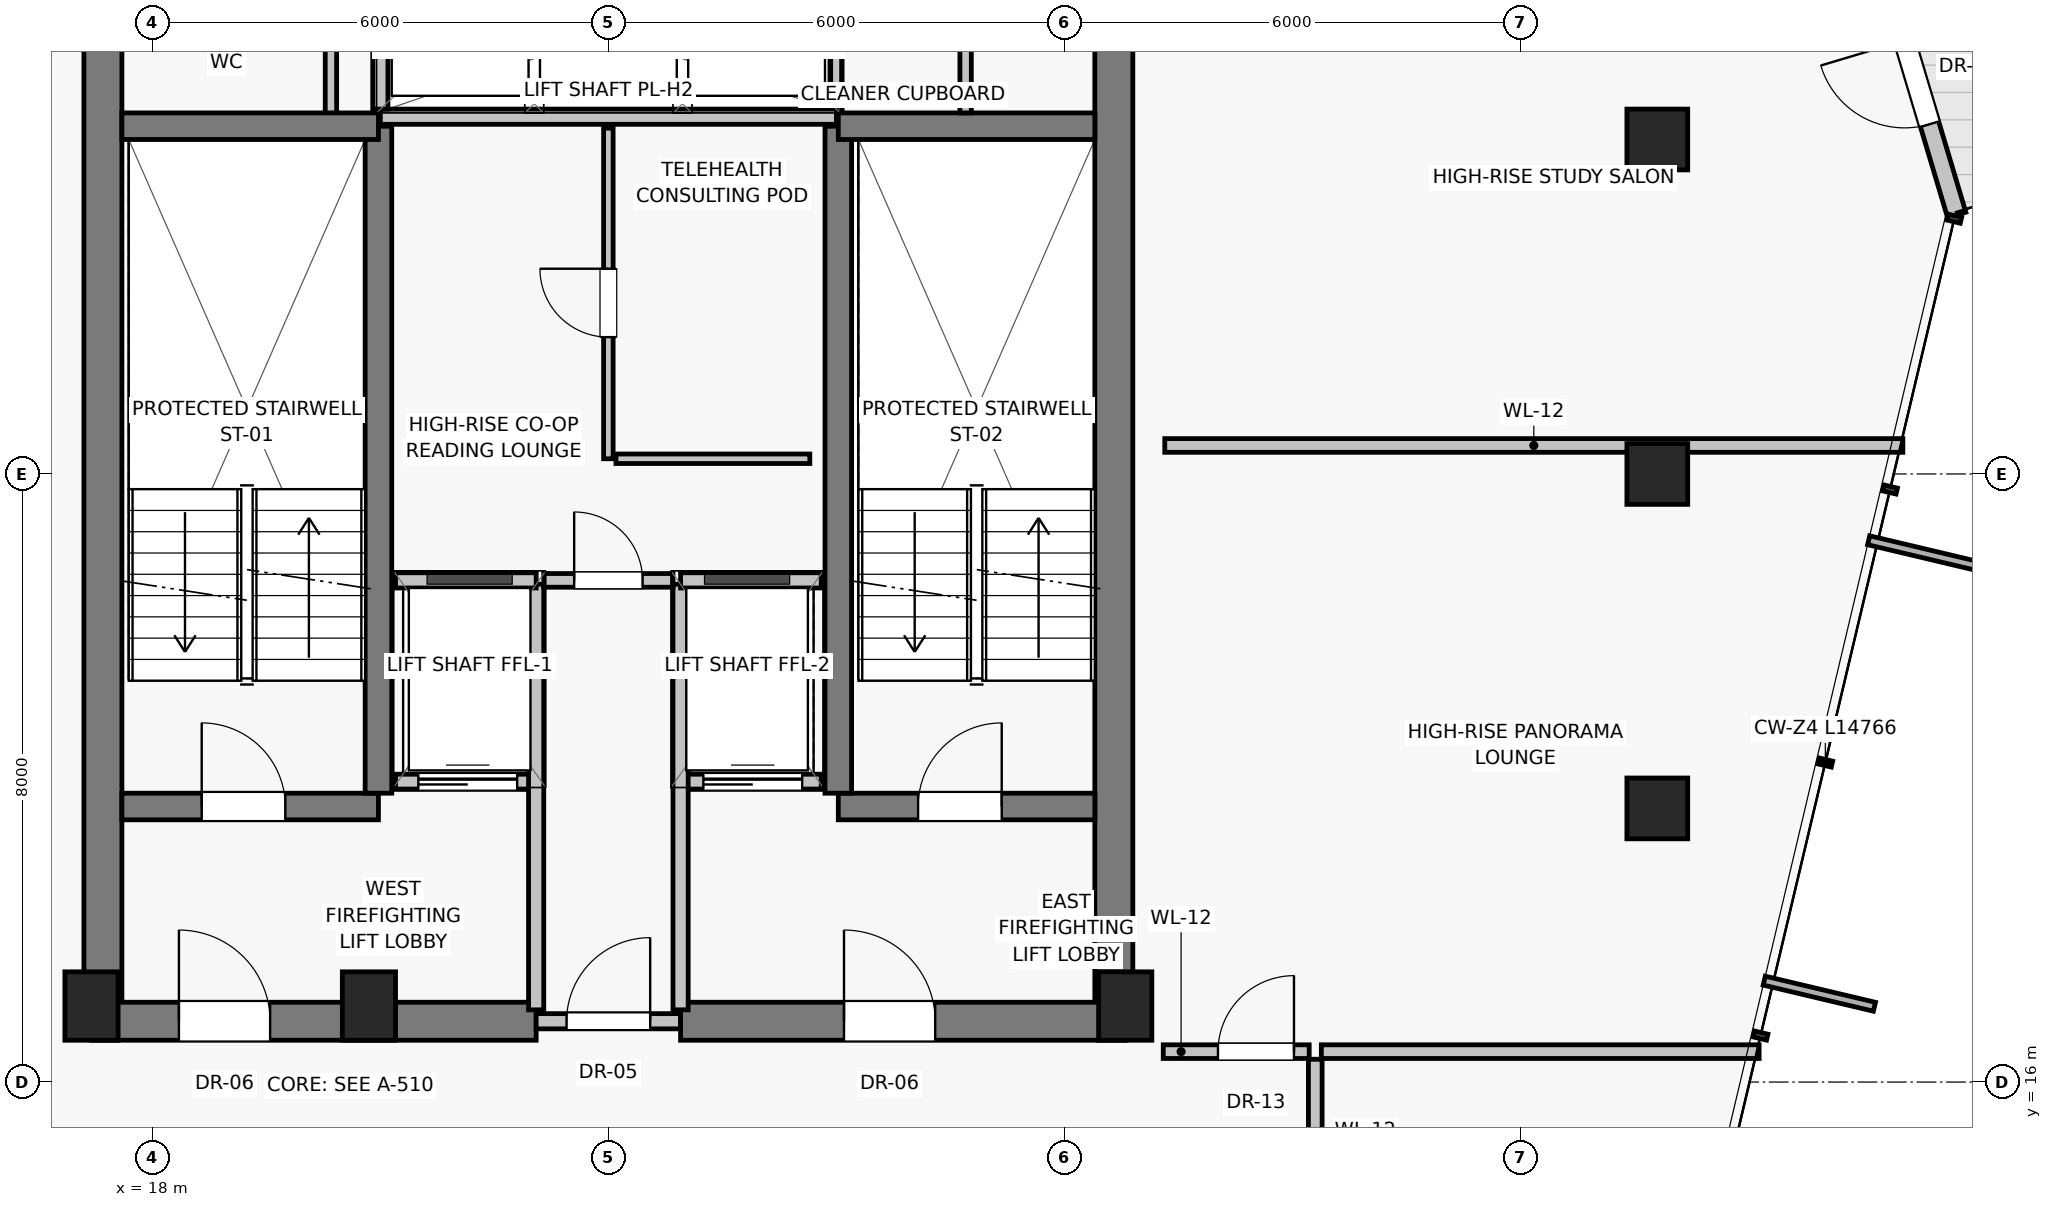
"""IFC4 building model, lengths in metres.
Left out: names, types, materials, properties, quantities, classifications, styles, units other than length and angle.
Written with IfcOpenShell. Run it as: python <this file> out.ifc"""

import sys

from ifc_helpers import new_model, si_unit, direction, frame, frame_2d, origin, origin_2d, place, context, subcontext, project, spatial, rectangle, extrude, source, transform, mapped, element, fill, save


model = new_model("IFC4")
c1 = context("Model", 3, precision=1e-05, world=origin(), true_north=direction((0.0, 1.0)))
c2 = subcontext(c1, "Body", "Model", "MODEL_VIEW")
j1 = project(units=[si_unit("LENGTHUNIT", "METRE"), si_unit("PLANEANGLEUNIT", "RADIAN")], contexts=[c1])
p1 = place(None, origin())
s1 = spatial("IfcSite", under=j1, at=p1, CompositionType="ELEMENT")
p2 = place(p1, origin())
s2 = spatial("IfcBuilding", under=s1, at=p2, CompositionType="ELEMENT")
p3 = place(p2, frame((0.0, 0.0, 254.5)))
s3 = spatial("IfcBuildingStorey", under=s2, at=p3, CompositionType="ELEMENT", Elevation=254.5)
for number, where, z_axis, x_axis in (
    (1, (17.2, 17.0, 0.0), (0.0, 0.0, 1.0), (1.0, 0.0, 0.0)),
    (2, (20.85, 17.0, 0.0), (0.0, 0.0, 1.0), (1.0, 0.0, 0.0)),
    (3, (30.8, 17.0, 0.0), (0.0, 0.0, 1.0), (1.0, 0.0, 0.0)),
):
    element("IfcColumn", number, at=place(p3, frame(where, z_axis=z_axis, x_axis=x_axis)), inside=s3, PredefinedType="PILASTER", context=c2, shape_type="SweptSolid", body=[
        extrude(rectangle(XDim=0.7, YDim=0.9, at=origin_2d()), origin(), (0.0, 0.0, 1.0), 3.25),
    ])
for number, where, z_axis, x_axis in (
    (4, (37.8, 19.6, 0.0), (0.0, 0.0, 1.0), (1.0, 0.0, 0.0)),
    (5, (37.8, 24.0, 0.0), (0.0, 0.0, 1.0), (1.0, 0.0, 0.0)),
    (6, (37.8, 28.4, 0.0), (0.0, 0.0, 1.0), (1.0, 0.0, 0.0)),
):
    element("IfcColumn", number, at=place(p3, frame(where, z_axis=z_axis, x_axis=x_axis)), inside=s3, PredefinedType="COLUMN", context=c2, shape_type="SweptSolid", body=[
        extrude(rectangle(XDim=0.8, YDim=0.8, at=origin_2d()), origin(), (0.0, 0.0, 1.0), 3.25),
    ])
p4 = place(p3, frame((41.74, 27.407, 0.0), z_axis=(0.0, 0.0, 1.0), x_axis=(-0.286720644461, 0.958014233736, 0.0)))
e7 = element("IfcWall", 7, at=p4, inside=s3, PredefinedType="SOLIDWALL", context=c2, shape_type="SweptSolid", body=[
    extrude(rectangle(XDim=3.643, YDim=0.25, at=frame_2d((1.821, 0.0))), origin(), (0.0, 0.0, 1.0), 3.015),
])
p5 = place(p4, frame((1.246, 0.0, 0.0)))
e8 = element("IfcOpeningElement", 8, at=p5, cuts=e7, PredefinedType="OPENING", context=c2, shape_type="SweptSolid", body=[
    extrude(rectangle(XDim=1.15, YDim=2.25, at=frame_2d((0.575, 1.125))), frame((0.0, 0.135, 0.0), z_axis=(0.0, -1.0, 0.0), x_axis=(1.0, 0.0, 0.0)), (0.0, 0.0, 1.0), 0.27),
])
for number, where, z_axis, x_axis in (
    (9, (17.35, 16.8, 0.0), (0.0, 0.0, 1.0), (0.0, 1.0, 0.0)),
    (10, (30.65, 16.8, 0.0), (0.0, 0.0, 1.0), (0.0, 1.0, 0.0)),
):
    element("IfcWall", number, at=place(p3, frame(where, z_axis=z_axis, x_axis=x_axis)), inside=s3, PredefinedType="SHEAR", context=c2, shape_type="SweptSolid", body=[
        extrude(rectangle(XDim=14.2, YDim=0.5, at=frame_2d((7.1, 0.0))), origin(), (0.0, 0.0, 1.0), 3.015),
    ])
p6 = place(p3, frame((17.2, 16.8, 0.0), z_axis=(0.0, 0.0, 1.0), x_axis=(1.0, 0.0, 0.0)))
e11 = element("IfcWall", 11, at=p6, inside=s3, PredefinedType="SHEAR", context=c2, shape_type="SweptSolid", body=[
    extrude(rectangle(XDim=5.85, YDim=0.5, at=frame_2d((2.925, 0.0))), origin(), (0.0, 0.0, 1.0), 3.015),
])
p7 = place(p6, frame((1.15, 0.0, 0.0)))
e12 = element("IfcOpeningElement", 12, at=p7, cuts=e11, PredefinedType="OPENING", context=c2, shape_type="SweptSolid", body=[
    extrude(rectangle(XDim=1.2, YDim=2.03, at=frame_2d((0.6, 1.015))), frame((0.0, 0.26, 0.0), z_axis=(0.0, -1.0, 0.0), x_axis=(1.0, 0.0, 0.0)), (0.0, 0.0, 1.0), 0.52),
])
p8 = place(p3, frame((23.05, 16.8, 0.0), z_axis=(0.0, 0.0, 1.0), x_axis=(1.0, 0.0, 0.0)))
e13 = element("IfcWall", 13, at=p8, inside=s3, PredefinedType="SOLIDWALL", context=c2, shape_type="SweptSolid", body=[
    extrude(rectangle(XDim=1.9, YDim=0.2, at=frame_2d((0.95, 0.0))), origin(), (0.0, 0.0, 1.0), 2.165),
])
p9 = place(p8, frame((0.4, 0.0, 0.0)))
e14 = element("IfcOpeningElement", 14, at=p9, cuts=e13, PredefinedType="OPENING", context=c2, shape_type="SweptSolid", body=[
    extrude(rectangle(XDim=1.1, YDim=2.03, at=frame_2d((0.55, 1.015))), frame((0.0, 0.11, 0.0), z_axis=(0.0, -1.0, 0.0), x_axis=(1.0, 0.0, 0.0)), (0.0, 0.0, 1.0), 0.22),
])
p10 = place(p3, frame((24.95, 16.8, 0.0), z_axis=(0.0, 0.0, 1.0), x_axis=(1.0, 0.0, 0.0)))
e15 = element("IfcWall", 15, at=p10, inside=s3, PredefinedType="SHEAR", context=c2, shape_type="SweptSolid", body=[
    extrude(rectangle(XDim=5.85, YDim=0.5, at=frame_2d((2.925, 0.0))), origin(), (0.0, 0.0, 1.0), 3.015),
])
p11 = place(p10, frame((2.15, 0.0, 0.0)))
e16 = element("IfcOpeningElement", 16, at=p11, cuts=e15, PredefinedType="OPENING", context=c2, shape_type="SweptSolid", body=[
    extrude(rectangle(XDim=1.2, YDim=2.03, at=frame_2d((0.6, 1.015))), frame((0.0, 0.26, 0.0), z_axis=(0.0, -1.0, 0.0), x_axis=(1.0, 0.0, 0.0)), (0.0, 0.0, 1.0), 0.52),
])
for number, where, z_axis, x_axis in (
    (17, (20.35, 28.65, 0.0), (0.0, 0.0, 1.0), (0.0, 1.0, 0.0)),
    (18, (27.0, 28.65, 0.0), (0.0, 0.0, 1.0), (0.0, 1.0, 0.0)),
):
    element("IfcWall", number, at=place(p3, frame(where, z_axis=z_axis, x_axis=x_axis)), inside=s3, PredefinedType="PARTITIONING", context=c2, shape_type="SweptSolid", body=[
        extrude(rectangle(XDim=2.2, YDim=0.15, at=frame_2d((1.1, 0.0))), origin(), (0.0, 0.0, 1.0), 3.015),
    ])
p12 = place(p3, frame((17.6, 19.625, 0.0), z_axis=(0.0, 0.0, 1.0), x_axis=(1.0, 0.0, 0.0)))
e19 = element("IfcWall", 19, at=p12, inside=s3, PredefinedType="SHEAR", context=c2, shape_type="SweptSolid", body=[
    extrude(rectangle(XDim=3.375, YDim=0.35, at=frame_2d((1.688, 0.0))), origin(), (0.0, 0.0, 1.0), 3.015),
])
p13 = place(p12, frame((1.05, 0.0, 0.0)))
e20 = element("IfcOpeningElement", 20, at=p13, cuts=e19, PredefinedType="OPENING", context=c2, shape_type="SweptSolid", body=[
    extrude(rectangle(XDim=1.1, YDim=2.03, at=frame_2d((0.55, 1.015))), frame((0.0, 0.185, 0.0), z_axis=(0.0, -1.0, 0.0), x_axis=(1.0, 0.0, 0.0)), (0.0, 0.0, 1.0), 0.37),
])
p14 = place(p3, frame((21.2, 19.95, 0.0), z_axis=(0.0, 0.0, 1.0), x_axis=(1.0, 0.0, 0.0)))
e21 = element("IfcWall", 21, at=p14, inside=s3, PredefinedType="SOLIDWALL", context=c2, shape_type="SweptSolid", body=[
    extrude(rectangle(XDim=1.85, YDim=0.2, at=frame_2d((0.925, 0.0))), origin(), (0.0, 0.0, 1.0), 3.015),
])
p15 = place(p14, frame((0.3, 0.0, 0.0)))
e22 = element("IfcOpeningElement", 22, at=p15, cuts=e21, PredefinedType="OPENING", context=c2, shape_type="SweptSolid", body=[
    extrude(rectangle(XDim=1.3, YDim=2.25, at=frame_2d((0.65, 1.125))), frame((0.0, 0.11, 0.0), z_axis=(0.0, -1.0, 0.0), x_axis=(1.0, 0.0, 0.0)), (0.0, 0.0, 1.0), 0.22),
])
p16 = place(p3, frame((24.95, 19.95, 0.0), z_axis=(0.0, 0.0, 1.0), x_axis=(1.0, 0.0, 0.0)))
e23 = element("IfcWall", 23, at=p16, inside=s3, PredefinedType="SOLIDWALL", context=c2, shape_type="SweptSolid", body=[
    extrude(rectangle(XDim=1.85, YDim=0.2, at=frame_2d((0.925, 0.0))), origin(), (0.0, 0.0, 1.0), 3.015),
])
p17 = place(p16, frame((0.3, 0.0, 0.0)))
e24 = element("IfcOpeningElement", 24, at=p17, cuts=e23, PredefinedType="OPENING", context=c2, shape_type="SweptSolid", body=[
    extrude(rectangle(XDim=1.3, YDim=2.25, at=frame_2d((0.65, 1.125))), frame((0.0, 0.11, 0.0), z_axis=(0.0, -1.0, 0.0), x_axis=(1.0, 0.0, 0.0)), (0.0, 0.0, 1.0), 0.22),
])
p18 = place(p3, frame((27.025, 19.625, 0.0), z_axis=(0.0, 0.0, 1.0), x_axis=(1.0, 0.0, 0.0)))
e25 = element("IfcWall", 25, at=p18, inside=s3, PredefinedType="SHEAR", context=c2, shape_type="SweptSolid", body=[
    extrude(rectangle(XDim=3.375, YDim=0.35, at=frame_2d((1.688, 0.0))), origin(), (0.0, 0.0, 1.0), 3.015),
])
p19 = place(p18, frame((1.05, 0.0, 0.0)))
e26 = element("IfcOpeningElement", 26, at=p19, cuts=e25, PredefinedType="OPENING", context=c2, shape_type="SweptSolid", body=[
    extrude(rectangle(XDim=1.1, YDim=2.03, at=frame_2d((0.55, 1.015))), frame((0.0, 0.185, 0.0), z_axis=(0.0, -1.0, 0.0), x_axis=(1.0, 0.0, 0.0)), (0.0, 0.0, 1.0), 0.37),
])
for number, where, z_axis, x_axis in (
    (27, (20.975, 19.8, 0.0), (0.0, 0.0, 1.0), (0.0, 1.0, 0.0)),
    (28, (27.025, 19.8, 0.0), (0.0, 0.0, 1.0), (0.0, 1.0, 0.0)),
):
    element("IfcWall", number, at=place(p3, frame(where, z_axis=z_axis, x_axis=x_axis)), inside=s3, PredefinedType="SHEAR", context=c2, shape_type="SweptSolid", body=[
        extrude(rectangle(XDim=8.775, YDim=0.35, at=frame_2d((4.387, 0.0))), origin(), (0.0, 0.0, 1.0), 3.015),
    ])
for number, where, z_axis, x_axis in (
    (29, (17.6, 28.575, 0.0), (0.0, 0.0, 1.0), (1.0, 0.0, 0.0)),
    (30, (27.025, 28.575, 0.0), (0.0, 0.0, 1.0), (1.0, 0.0, 0.0)),
):
    element("IfcWall", number, at=place(p3, frame(where, z_axis=z_axis, x_axis=x_axis)), inside=s3, PredefinedType="SHEAR", context=c2, shape_type="SweptSolid", body=[
        extrude(rectangle(XDim=3.375, YDim=0.35, at=frame_2d((1.688, 0.0))), origin(), (0.0, 0.0, 1.0), 3.015),
    ])
for number, where, z_axis, x_axis in (
    (31, (23.05, 16.95, 0.0), (0.0, 0.0, 1.0), (0.0, 1.0, 0.0)),
    (32, (24.95, 16.95, 0.0), (0.0, 0.0, 1.0), (0.0, 1.0, 0.0)),
):
    element("IfcWall", number, at=place(p3, frame(where, z_axis=z_axis, x_axis=x_axis)), inside=s3, PredefinedType="SOLIDWALL", context=c2, shape_type="SweptSolid", body=[
        extrude(rectangle(XDim=5.6, YDim=0.2, at=frame_2d((2.8, 0.0))), origin(), (0.0, 0.0, 1.0), 3.015),
    ])
for number, where, z_axis, x_axis in (
    (33, (21.2, 22.6, 0.0), (0.0, 0.0, 1.0), (1.0, 0.0, 0.0)),
    (34, (24.95, 22.6, 0.0), (0.0, 0.0, 1.0), (1.0, 0.0, 0.0)),
):
    element("IfcWall", number, at=place(p3, frame(where, z_axis=z_axis, x_axis=x_axis)), inside=s3, PredefinedType="SOLIDWALL", context=c2, shape_type="SweptSolid", body=[
        extrude(rectangle(XDim=1.85, YDim=0.2, at=frame_2d((0.925, 0.0))), origin(), (0.0, 0.0, 1.0), 3.015),
    ])
p20 = place(p3, frame((21.0, 28.7, 0.0), z_axis=(0.0, 0.0, 1.0), x_axis=(1.0, 0.0, 0.0)))
e35 = element("IfcWall", 35, at=p20, inside=s3, PredefinedType="SOLIDWALL", context=c2, shape_type="SweptSolid", body=[
    extrude(rectangle(XDim=6.0, YDim=0.2, at=frame_2d((3.0, 0.0))), origin(), (0.0, 0.0, 1.0), 3.015),
])
p21 = place(p3, frame((21.0, 28.8, 0.0), z_axis=(0.0, 0.0, 1.0), x_axis=(0.0, 1.0, 0.0)))
e36 = element("IfcWall", 36, at=p21, inside=s3, PredefinedType="SOLIDWALL", context=c2, shape_type="SweptSolid", body=[
    extrude(rectangle(XDim=1.6, YDim=0.2, at=frame_2d((0.8, 0.0))), origin(), (0.0, 0.0, 1.0), 3.015),
])
p22 = place(p3, frame((23.15, 22.6, 0.0), z_axis=(0.0, 0.0, 1.0), x_axis=(1.0, 0.0, 0.0)))
e37 = element("IfcWall", 37, at=p22, inside=s3, PredefinedType="PARTITIONING", context=c2, shape_type="SweptSolid", body=[
    extrude(rectangle(XDim=1.7, YDim=0.18, at=frame_2d((0.85, 0.0))), origin(), (0.0, 0.0, 1.0), 3.015),
])
p23 = place(p22, frame((0.4, 0.0, 0.0)))
e38 = element("IfcOpeningElement", 38, at=p23, cuts=e37, PredefinedType="OPENING", context=c2, shape_type="SweptSolid", body=[
    extrude(rectangle(XDim=0.9, YDim=2.01, at=frame_2d((0.45, 1.005))), frame((0.0, 0.1, 0.0), z_axis=(0.0, -1.0, 0.0), x_axis=(1.0, 0.0, 0.0)), (0.0, 0.0, 1.0), 0.2),
])
p24 = place(p3, frame((24.1, 24.2, 0.0), z_axis=(0.0, 0.0, 1.0), x_axis=(1.0, 0.0, 0.0)))
e39 = element("IfcWall", 39, at=p24, inside=s3, PredefinedType="PARTITIONING", context=c2, shape_type="SweptSolid", body=[
    extrude(rectangle(XDim=2.55, YDim=0.125, at=frame_2d((1.275, 0.0))), origin(), (0.0, 0.0, 1.0), 3.015),
])
p25 = place(p3, frame((24.0, 24.2, 0.0), z_axis=(0.0, 0.0, 1.0), x_axis=(0.0, 1.0, 0.0)))
e40 = element("IfcWall", 40, at=p25, inside=s3, PredefinedType="PARTITIONING", context=c2, shape_type="SweptSolid", body=[
    extrude(rectangle(XDim=4.35, YDim=0.125, at=frame_2d((2.175, 0.0))), origin(), (0.0, 0.0, 1.0), 3.015),
])
p26 = place(p25, frame((1.6, 0.0, 0.0)))
e41 = element("IfcOpeningElement", 41, at=p26, cuts=e40, PredefinedType="OPENING", context=c2, shape_type="SweptSolid", body=[
    extrude(rectangle(XDim=0.9, YDim=2.01, at=frame_2d((0.45, 1.005))), frame((0.0, 0.073, 0.0), z_axis=(0.0, -1.0, 0.0), x_axis=(1.0, 0.0, 0.0)), (0.0, 0.0, 1.0), 0.145),
])
p27 = place(p3, frame((28.7, 28.75, 0.0), z_axis=(0.0, 0.0, 1.0), x_axis=(0.0, 1.0, 0.0)))
e42 = element("IfcWall", 42, at=p27, inside=s3, PredefinedType="PARTITIONING", context=c2, shape_type="SweptSolid", body=[
    extrude(rectangle(XDim=2.0, YDim=0.15, at=frame_2d((1.0, 0.0))), origin(), (0.0, 0.0, 1.0), 3.015),
])
p28 = place(p3, frame((31.32, 24.375, 0.0), z_axis=(0.0, 0.0, 1.0), x_axis=(1.0, 0.0, 0.0)))
e43 = element("IfcWall", 43, at=p28, inside=s3, PredefinedType="PARTITIONING", context=c2, shape_type="SweptSolid", body=[
    extrude(rectangle(XDim=9.71, YDim=0.18, at=frame_2d((4.855, 0.0))), origin(), (0.0, 0.0, 1.0), 3.015),
])
p29 = place(p3, frame((33.3, 14.4, 0.0), z_axis=(0.0, 0.0, 1.0), x_axis=(0.0, 1.0, 0.0)))
e44 = element("IfcWall", 44, at=p29, inside=s3, PredefinedType="PARTITIONING", context=c2, shape_type="SweptSolid", body=[
    extrude(rectangle(XDim=1.9, YDim=0.18, at=frame_2d((0.95, 0.0))), origin(), (0.0, 0.0, 1.0), 3.015),
])
p30 = place(p3, frame((31.3, 16.4, 0.0), z_axis=(0.0, 0.0, 1.0), x_axis=(1.0, 0.0, 0.0)))
e45 = element("IfcWall", 45, at=p30, inside=s3, PredefinedType="PARTITIONING", context=c2, shape_type="SweptSolid", body=[
    extrude(rectangle(XDim=1.92, YDim=0.18, at=frame_2d((0.96, 0.0))), origin(), (0.0, 0.0, 1.0), 3.015),
])
p31 = place(p30, frame((0.72, 0.0, 0.0)))
e46 = element("IfcOpeningElement", 46, at=p31, cuts=e45, PredefinedType="OPENING", context=c2, shape_type="SweptSolid", body=[
    extrude(rectangle(XDim=1.0, YDim=2.01, at=frame_2d((0.5, 1.005))), frame((0.0, 0.1, 0.0), z_axis=(0.0, -1.0, 0.0), x_axis=(1.0, 0.0, 0.0)), (0.0, 0.0, 1.0), 0.2),
])
p32 = place(p3, frame((33.38, 16.4, 0.0), z_axis=(0.0, 0.0, 1.0), x_axis=(1.0, 0.0, 0.0)))
e47 = element("IfcWall", 47, at=p32, inside=s3, PredefinedType="PARTITIONING", context=c2, shape_type="SweptSolid", body=[
    extrude(rectangle(XDim=5.76, YDim=0.18, at=frame_2d((2.88, 0.0))), origin(), (0.0, 0.0, 1.0), 3.015),
])
m1 = source(origin(), c2, "Body", "SweptSolid", [
    extrude(rectangle(XDim=1.15, YDim=2.25, at=frame_2d((0.575, 1.125))), frame((0.0, 0.025, 0.0), z_axis=(0.0, -1.0, 0.0), x_axis=(1.0, 0.0, 0.0)), (0.0, 0.0, 1.0), 0.05),
])
p33 = place(p5, frame((1.15, 0.0, 0.0), z_axis=(0.0, 0.0, 1.0), x_axis=(-1.0, 0.0, 0.0)))
e48 = element("IfcDoor", 48, at=p33, inside=s3, OperationType="SINGLE_SWING_RIGHT", PredefinedType="DOOR", context=c2, shape_type="MappedRepresentation", body=[
    mapped(m1, transform((0.0, 0.0, 0.0), scale=1.0)),
])
fill(e8, e48)
m2 = source(origin(), c2, "Body", "SweptSolid", [
    extrude(rectangle(XDim=1.2, YDim=2.03, at=frame_2d((0.6, 1.015))), frame((0.0, 0.025, 0.0), z_axis=(0.0, -1.0, 0.0), x_axis=(1.0, 0.0, 0.0)), (0.0, 0.0, 1.0), 0.05),
])
p34 = place(p7, origin())
e49 = element("IfcDoor", 49, at=p34, inside=s3, OperationType="SINGLE_SWING_LEFT", PredefinedType="DOOR", context=c2, shape_type="MappedRepresentation", body=[
    mapped(m2, transform((0.0, 0.0, 0.0), scale=1.0)),
])
fill(e12, e49)
m3 = source(origin(), c2, "Body", "SweptSolid", [
    extrude(rectangle(XDim=1.1, YDim=2.03, at=frame_2d((0.55, 1.015))), frame((0.0, 0.025, 0.0), z_axis=(0.0, -1.0, 0.0), x_axis=(1.0, 0.0, 0.0)), (0.0, 0.0, 1.0), 0.05),
])
p35 = place(p9, origin())
e50 = element("IfcDoor", 50, at=p35, inside=s3, OperationType="SINGLE_SWING_RIGHT", PredefinedType="DOOR", context=c2, shape_type="MappedRepresentation", body=[
    mapped(m3, transform((0.0, 0.0, 0.0), scale=1.0)),
])
fill(e14, e50)
p36 = place(p11, origin())
e51 = element("IfcDoor", 51, at=p36, inside=s3, OperationType="SINGLE_SWING_LEFT", PredefinedType="DOOR", context=c2, shape_type="MappedRepresentation", body=[
    mapped(m2, transform((0.0, 0.0, 0.0), scale=1.0)),
])
fill(e16, e51)
p37 = place(p13, origin())
e52 = element("IfcDoor", 52, at=p37, inside=s3, OperationType="SINGLE_SWING_LEFT", PredefinedType="DOOR", context=c2, shape_type="MappedRepresentation", body=[
    mapped(m3, transform((0.0, 0.0, 0.0), scale=1.0)),
])
fill(e20, e52)
m4 = source(origin(), c2, "Body", "SweptSolid", [
    extrude(rectangle(XDim=1.3, YDim=2.25, at=frame_2d((0.65, 1.125))), frame((0.0, 0.025, 0.0), z_axis=(0.0, -1.0, 0.0), x_axis=(1.0, 0.0, 0.0)), (0.0, 0.0, 1.0), 0.05),
])
p38 = place(p15, origin())
e53 = element("IfcDoor", 53, at=p38, inside=s3, OperationType="SLIDING_TO_LEFT", PredefinedType="DOOR", context=c2, shape_type="MappedRepresentation", body=[
    mapped(m4, transform((0.0, 0.0, 0.0), scale=1.0)),
])
fill(e22, e53)
p39 = place(p17, origin())
e54 = element("IfcDoor", 54, at=p39, inside=s3, OperationType="SLIDING_TO_LEFT", PredefinedType="DOOR", context=c2, shape_type="MappedRepresentation", body=[
    mapped(m4, transform((0.0, 0.0, 0.0), scale=1.0)),
])
fill(e24, e54)
p40 = place(p19, origin())
e55 = element("IfcDoor", 55, at=p40, inside=s3, OperationType="SINGLE_SWING_RIGHT", PredefinedType="DOOR", context=c2, shape_type="MappedRepresentation", body=[
    mapped(m3, transform((0.0, 0.0, 0.0), scale=1.0)),
])
fill(e26, e55)
m5 = source(origin(), c2, "Body", "SweptSolid", [
    extrude(rectangle(XDim=0.9, YDim=2.01, at=frame_2d((0.45, 1.005))), frame((0.0, 0.025, 0.0), z_axis=(0.0, -1.0, 0.0), x_axis=(1.0, 0.0, 0.0)), (0.0, 0.0, 1.0), 0.05),
])
p41 = place(p23, origin())
e56 = element("IfcDoor", 56, at=p41, inside=s3, OperationType="SINGLE_SWING_LEFT", PredefinedType="DOOR", context=c2, shape_type="MappedRepresentation", body=[
    mapped(m5, transform((0.0, 0.0, 0.0), scale=1.0)),
])
fill(e38, e56)
p42 = place(p26, origin())
e57 = element("IfcDoor", 57, at=p42, inside=s3, OperationType="SINGLE_SWING_RIGHT", PredefinedType="DOOR", context=c2, shape_type="MappedRepresentation", body=[
    mapped(m5, transform((0.0, 0.0, 0.0), scale=1.0)),
])
fill(e41, e57)
m6 = source(origin(), c2, "Body", "SweptSolid", [
    extrude(rectangle(XDim=1.0, YDim=2.01, at=frame_2d((0.5, 1.005))), frame((0.0, 0.025, 0.0), z_axis=(0.0, -1.0, 0.0), x_axis=(1.0, 0.0, 0.0)), (0.0, 0.0, 1.0), 0.05),
])
p43 = place(p31, origin())
e58 = element("IfcDoor", 58, at=p43, inside=s3, OperationType="SINGLE_SWING_RIGHT", PredefinedType="DOOR", context=c2, shape_type="MappedRepresentation", body=[
    mapped(m6, transform((0.0, 0.0, 0.0), scale=1.0)),
])
fill(e46, e58)
save(model, sys.argv[1])
